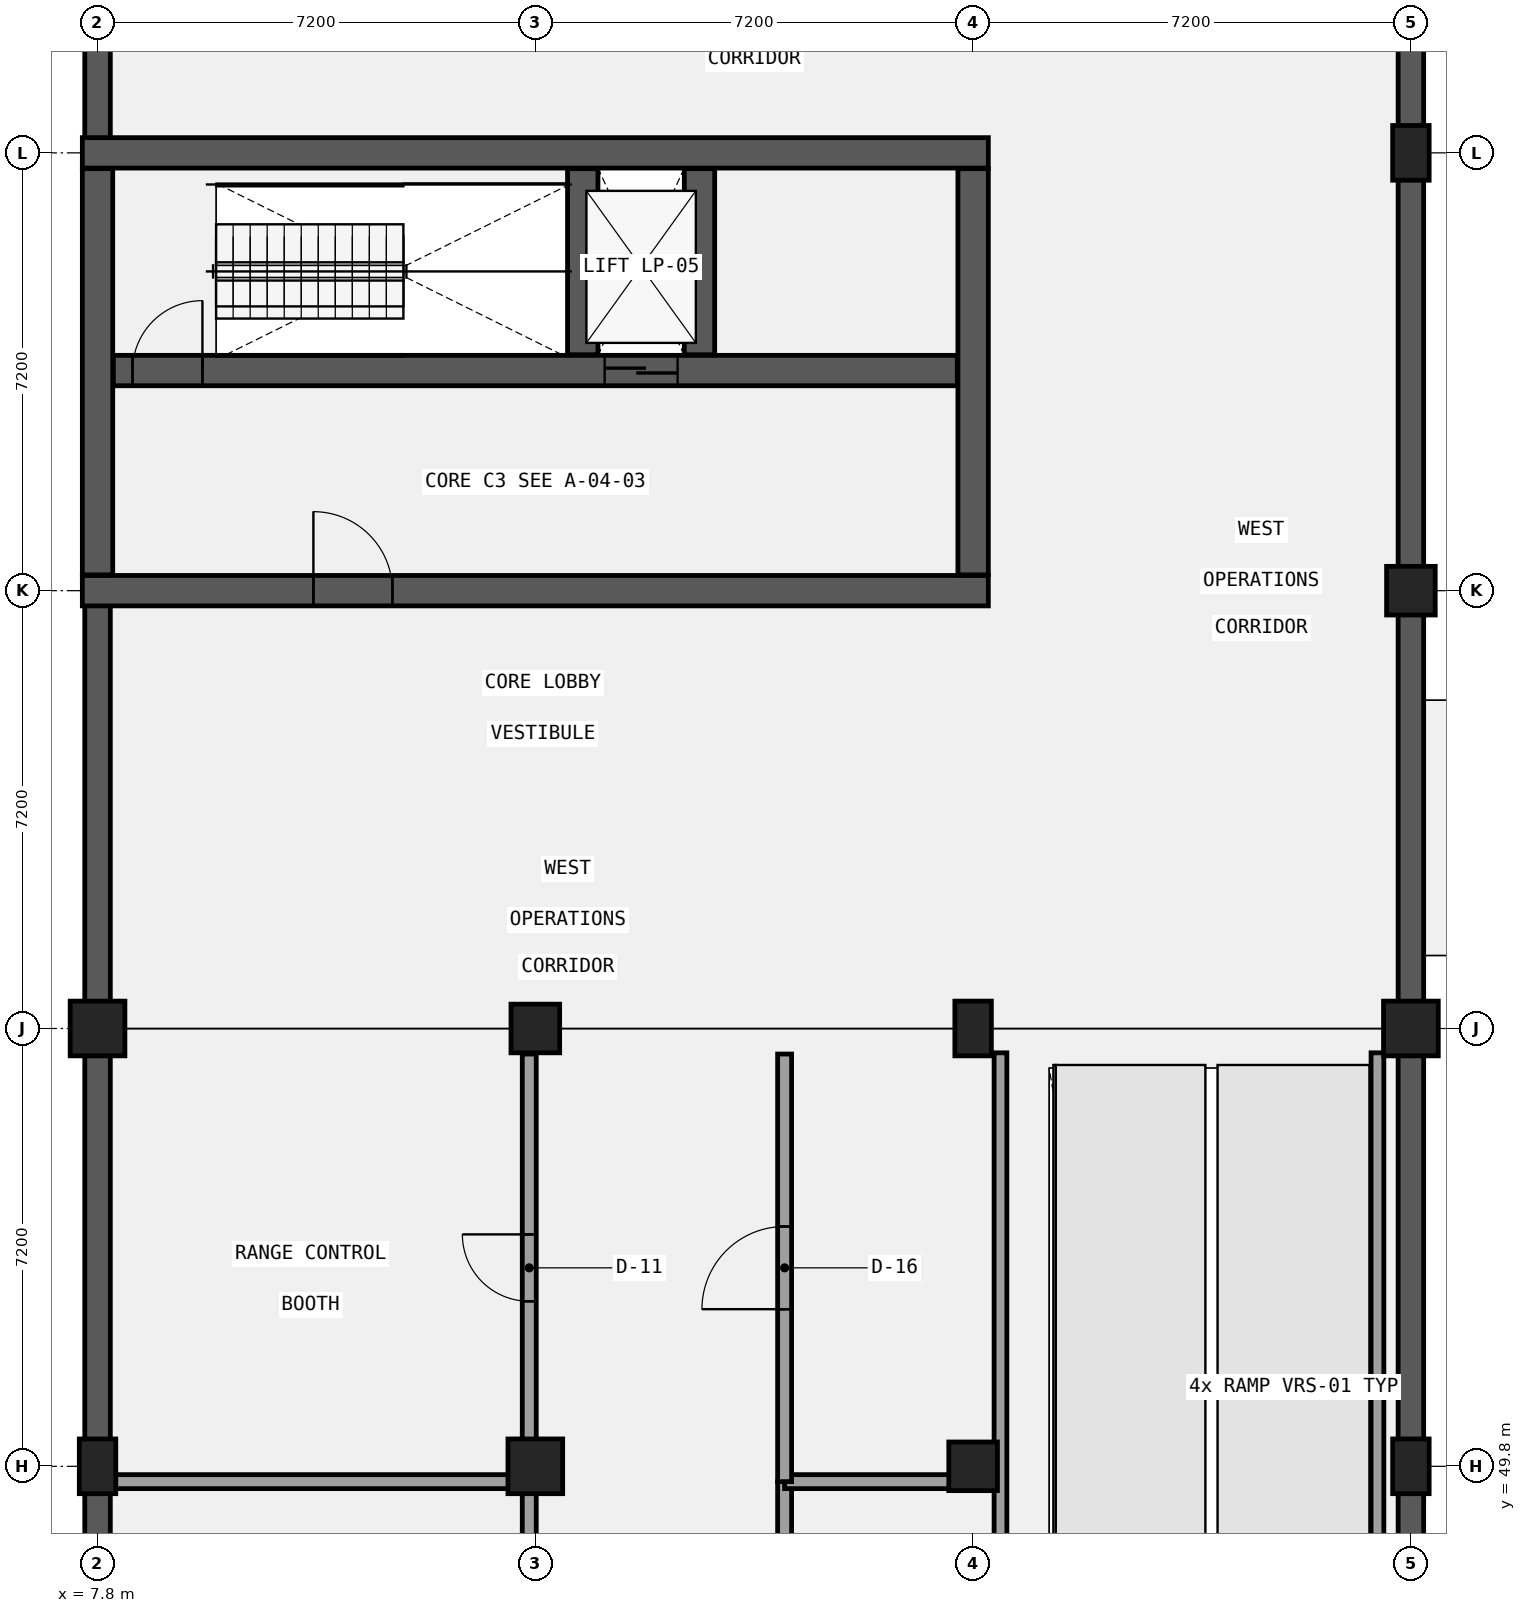
"""IFC4 building model, lengths in metres.
Left out: names, types, materials, properties, quantities, classifications, styles, units other than length and angle.
Written with IfcOpenShell. Run it as: python <this file> out.ifc"""

import sys

from ifc_helpers import new_model, si_unit, direction, frame, frame_2d, origin, origin_2d, place, context, subcontext, project, spatial, rectangle, extrude, element, fill, save


model = new_model("IFC4")
c1 = context("Model", 3, precision=1e-05, world=origin(), true_north=direction((0.0, 1.0)))
c2 = subcontext(c1, "Body", "Model", "MODEL_VIEW")
j1 = project(units=[si_unit("LENGTHUNIT", "METRE"), si_unit("PLANEANGLEUNIT", "RADIAN")], contexts=[c1])
p1 = place(None, origin())
s1 = spatial("IfcSite", under=j1, at=p1, CompositionType="ELEMENT")
p2 = place(p1, origin())
s2 = spatial("IfcBuilding", under=s1, at=p2, CompositionType="ELEMENT")
p3 = place(p2, frame((0.0, 0.0, -4.2)))
s3 = spatial("IfcBuildingStorey", under=s2, at=p3, CompositionType="ELEMENT", Elevation=-4.2)
p4 = place(p3, frame((7.8, 21.2, 0.0), z_axis=(0.0, 0.0, 1.0), x_axis=(0.0, 1.0, 0.0)))
e1 = element("IfcWall", 1, at=p4, inside=s3, PredefinedType="USERDEFINED", context=c2, shape_type="SweptSolid", body=[
    extrude(rectangle(XDim=35.6, YDim=0.42, at=frame_2d((17.8, 0.0))), origin(), (0.0, 0.0, 1.0), 2.88),
])
p5 = place(p3, frame((7.8, 57.2, 0.0), z_axis=(0.0, 0.0, 1.0), x_axis=(0.0, 1.0, 0.0)))
e2 = element("IfcWall", 2, at=p5, inside=s3, PredefinedType="USERDEFINED", context=c2, shape_type="SweptSolid", body=[
    extrude(rectangle(XDim=6.77, YDim=0.42, at=frame_2d((3.385, 0.0))), origin(), (0.0, 0.0, 1.0), 3.18),
])
p6 = place(p3, frame((7.8, 71.63, 0.0), z_axis=(0.0, 0.0, 1.0), x_axis=(0.0, 1.0, 0.0)))
e3 = element("IfcWall", 3, at=p6, inside=s3, PredefinedType="USERDEFINED", context=c2, shape_type="SweptSolid", body=[
    extrude(rectangle(XDim=6.77, YDim=0.42, at=frame_2d((3.385, 0.0))), origin(), (0.0, 0.0, 1.0), 3.03),
])
p7 = place(p3, frame((29.4, 78.4, 0.0), z_axis=(0.0, 0.0, 1.0), x_axis=(0.0, -1.0, 0.0)))
e4 = element("IfcWall", 4, at=p7, inside=s3, PredefinedType="USERDEFINED", context=c2, shape_type="SweptSolid", body=[
    extrude(rectangle(XDim=21.2, YDim=0.42, at=frame_2d((10.6, 0.0))), origin(), (0.0, 0.0, 1.0), 2.88),
])
p8 = place(p3, frame((29.4, 56.8, 0.0), z_axis=(0.0, 0.0, 1.0), x_axis=(0.0, -1.0, 0.0)))
e5 = element("IfcWall", 5, at=p8, inside=s3, PredefinedType="USERDEFINED", context=c2, shape_type="SweptSolid", body=[
    extrude(rectangle(XDim=21.2, YDim=0.42, at=frame_2d((10.6, 0.0))), origin(), (0.0, 0.0, 1.0), 3.03),
])
p9 = place(p3, frame((7.55, 71.4, 0.0), z_axis=(0.0, 0.0, 1.0), x_axis=(1.0, 0.0, 0.0)))
e6 = element("IfcWall", 6, at=p9, inside=s3, PredefinedType="SHEAR", context=c2, shape_type="SweptSolid", body=[
    extrude(rectangle(XDim=14.9, YDim=0.5, at=frame_2d((7.45, 0.0))), origin(), (0.0, 0.0, 1.0), 4.2),
])
p10 = place(p3, frame((7.55, 64.2, 0.0), z_axis=(0.0, 0.0, 1.0), x_axis=(1.0, 0.0, 0.0)))
e7 = element("IfcWall", 7, at=p10, inside=s3, PredefinedType="SHEAR", context=c2, shape_type="SweptSolid", body=[
    extrude(rectangle(XDim=14.9, YDim=0.5, at=frame_2d((7.45, 0.0))), origin(), (0.0, 0.0, 1.0), 4.2),
])
p11 = place(p10, frame((3.8, 0.0, 0.0)))
e8 = element("IfcOpeningElement", 8, at=p11, cuts=e7, PredefinedType="OPENING", context=c2, shape_type="SweptSolid", body=[
    extrude(rectangle(XDim=1.3, YDim=2.2, at=frame_2d((0.65, 1.1))), frame((0.0, 0.26, 0.0), z_axis=(0.0, -1.0, 0.0), x_axis=(1.0, 0.0, 0.0)), (0.0, 0.0, 1.0), 0.52),
])
for number, where, z_axis, x_axis in (
    (9, (7.8, 64.46, 0.0), (0.0, 0.0, 1.0), (0.0, 1.0, 0.0)),
    (10, (22.2, 64.46, 0.0), (0.0, 0.0, 1.0), (0.0, 1.0, 0.0)),
):
    element("IfcWall", number, at=place(p3, frame(where, z_axis=z_axis, x_axis=x_axis)), inside=s3, PredefinedType="SHEAR", context=c2, shape_type="SweptSolid", body=[
        extrude(rectangle(XDim=6.68, YDim=0.5, at=frame_2d((3.34, 0.0))), origin(), (0.0, 0.0, 1.0), 4.2),
    ])
p12 = place(p3, frame((8.06, 67.82, 0.0), z_axis=(0.0, 0.0, 1.0), x_axis=(1.0, 0.0, 0.0)))
e11 = element("IfcWall", 11, at=p12, inside=s3, PredefinedType="SHEAR", context=c2, shape_type="SweptSolid", body=[
    extrude(rectangle(XDim=13.88, YDim=0.5, at=frame_2d((6.94, 0.0))), origin(), (0.0, 0.0, 1.0), 4.2),
])
p13 = place(p12, frame((8.08, 0.0, 0.0)))
e12 = element("IfcOpeningElement", 12, at=p13, cuts=e11, PredefinedType="OPENING", context=c2, shape_type="SweptSolid", body=[
    extrude(rectangle(XDim=1.2, YDim=2.15, at=frame_2d((0.6, 1.075))), frame((0.0, 0.26, 0.0), z_axis=(0.0, -1.0, 0.0), x_axis=(1.0, 0.0, 0.0)), (0.0, 0.0, 1.0), 0.52),
])
p14 = place(p12, frame((0.315, 0.0, 0.0)))
e13 = element("IfcOpeningElement", 13, at=p14, cuts=e11, PredefinedType="OPENING", context=c2, shape_type="SweptSolid", body=[
    extrude(rectangle(XDim=1.15, YDim=2.15, at=frame_2d((0.575, 1.075))), frame((0.0, 0.26, 0.0), z_axis=(0.0, -1.0, 0.0), x_axis=(1.0, 0.0, 0.0)), (0.0, 0.0, 1.0), 0.52),
])
for number, where, z_axis, x_axis in (
    (14, (15.78, 68.08, 0.0), (0.0, 0.0, 1.0), (0.0, 1.0, 0.0)),
    (15, (17.7, 68.08, 0.0), (0.0, 0.0, 1.0), (0.0, 1.0, 0.0)),
):
    element("IfcWall", number, at=place(p3, frame(where, z_axis=z_axis, x_axis=x_axis)), inside=s3, PredefinedType="SHEAR", context=c2, shape_type="SweptSolid", body=[
        extrude(rectangle(XDim=3.06, YDim=0.5, at=frame_2d((1.53, 0.0))), origin(), (0.0, 0.0, 1.0), 4.2),
    ])
p15 = place(p3, frame((7.8, 49.8, 0.0), z_axis=(0.0, 0.0, 1.0), x_axis=(1.0, 0.0, 0.0)))
e16 = element("IfcColumn", 16, at=p15, inside=s3, PredefinedType="COLUMN", context=c2, shape_type="SweptSolid", body=[
    extrude(rectangle(XDim=0.6, YDim=0.9, at=origin_2d()), origin(), (0.0, 0.0, 1.0), 4.2),
])
for number, where, z_axis, x_axis in (
    (17, (7.8, 57.0, 0.0), (0.0, 0.0, 1.0), (1.0, 0.0, 0.0)),
    (18, (15.0, 49.8, 0.0), (0.0, 0.0, 1.0), (1.0, 0.0, 0.0)),
):
    element("IfcColumn", number, at=place(p3, frame(where, z_axis=z_axis, x_axis=x_axis)), inside=s3, PredefinedType="COLUMN", context=c2, shape_type="SweptSolid", body=[
        extrude(rectangle(XDim=0.9, YDim=0.9, at=origin_2d()), origin(), (0.0, 0.0, 1.0), 4.2),
    ])
for number, where, z_axis, x_axis in (
    (19, (15.0, 57.0, 0.0), (0.0, 0.0, 1.0), (1.0, 0.0, 0.0)),
    (20, (22.2, 49.8, 0.0), (0.0, 0.0, 1.0), (1.0, 0.0, 0.0)),
):
    element("IfcColumn", number, at=place(p3, frame(where, z_axis=z_axis, x_axis=x_axis)), inside=s3, PredefinedType="COLUMN", context=c2, shape_type="SweptSolid", body=[
        extrude(rectangle(XDim=0.8, YDim=0.8, at=origin_2d()), origin(), (0.0, 0.0, 1.0), 4.2),
    ])
for number, where, z_axis, x_axis in (
    (21, (22.2, 57.0, 0.0), (0.0, 0.0, 1.0), (1.0, 0.0, 0.0)),
    (22, (29.4, 49.8, 0.0), (0.0, 0.0, 1.0), (1.0, 0.0, 0.0)),
):
    element("IfcColumn", number, at=place(p3, frame(where, z_axis=z_axis, x_axis=x_axis)), inside=s3, PredefinedType="COLUMN", context=c2, shape_type="SweptSolid", body=[
        extrude(rectangle(XDim=0.6, YDim=0.9, at=origin_2d()), origin(), (0.0, 0.0, 1.0), 4.2),
    ])
p16 = place(p3, frame((29.4, 57.0, 0.0), z_axis=(0.0, 0.0, 1.0), x_axis=(1.0, 0.0, 0.0)))
e23 = element("IfcColumn", 23, at=p16, inside=s3, PredefinedType="COLUMN", context=c2, shape_type="SweptSolid", body=[
    extrude(rectangle(XDim=0.9, YDim=0.9, at=origin_2d()), origin(), (0.0, 0.0, 1.0), 4.2),
])
p17 = place(p3, frame((29.4, 64.2, 0.0), z_axis=(0.0, 0.0, 1.0), x_axis=(1.0, 0.0, 0.0)))
e24 = element("IfcColumn", 24, at=p17, inside=s3, PredefinedType="COLUMN", context=c2, shape_type="SweptSolid", body=[
    extrude(rectangle(XDim=0.8, YDim=0.8, at=origin_2d()), origin(), (0.0, 0.0, 1.0), 4.2),
])
p18 = place(p3, frame((29.4, 71.4, 0.0), z_axis=(0.0, 0.0, 1.0), x_axis=(1.0, 0.0, 0.0)))
e25 = element("IfcColumn", 25, at=p18, inside=s3, PredefinedType="COLUMN", context=c2, shape_type="SweptSolid", body=[
    extrude(rectangle(XDim=0.6, YDim=0.9, at=origin_2d()), origin(), (0.0, 0.0, 1.0), 4.2),
])
for number, where, z_axis, x_axis in (
    (26, (22.65, 24.6, 0.0), (0.0, 0.0, 1.0), (0.0, 1.0, 0.0)),
    (27, (28.85, 24.6, 0.0), (0.0, 0.0, 1.0), (0.0, 1.0, 0.0)),
):
    element("IfcWall", number, at=place(p3, frame(where, z_axis=z_axis, x_axis=x_axis)), inside=s3, PredefinedType="PARTITIONING", context=c2, shape_type="SweptSolid", body=[
        extrude(rectangle(XDim=32.0, YDim=0.21, at=frame_2d((16.0, 0.0))), origin(), (0.0, 0.0, 1.0), 3.88),
    ])
p19 = place(p3, frame((14.9, 42.516, 0.0), z_axis=(0.0, 0.0, 1.0), x_axis=(0.0, 1.0, 0.0)))
e28 = element("IfcWall", 28, at=p19, inside=s3, PredefinedType="PARTITIONING", context=c2, shape_type="SweptSolid", body=[
    extrude(rectangle(XDim=7.032, YDim=0.23, at=frame_2d((3.516, 0.0))), origin(), (0.0, 0.0, 1.0), 3.13),
])
p20 = place(p19, frame((2.966, 0.0, 0.0)))
e29 = element("IfcOpeningElement", 29, at=p20, cuts=e28, PredefinedType="OPENING", context=c2, shape_type="SweptSolid", body=[
    extrude(rectangle(XDim=1.1, YDim=2.1, at=frame_2d((0.55, 1.05))), frame((0.0, 0.125, 0.0), z_axis=(0.0, -1.0, 0.0), x_axis=(1.0, 0.0, 0.0)), (0.0, 0.0, 1.0), 0.25),
])
p21 = place(p3, frame((7.98, 49.548, 0.0), z_axis=(0.0, 0.0, 1.0), x_axis=(1.0, 0.0, 0.0)))
e30 = element("IfcWall", 30, at=p21, inside=s3, PredefinedType="PARTITIONING", context=c2, shape_type="SweptSolid", body=[
    extrude(rectangle(XDim=6.92, YDim=0.23, at=frame_2d((3.46, 0.0))), origin(), (0.0, 0.0, 1.0), 3.33),
])
p22 = place(p3, frame((14.9, 49.548, 0.0), z_axis=(0.0, 0.0, 1.0), x_axis=(0.0, 1.0, 0.0)))
e31 = element("IfcWall", 31, at=p22, inside=s3, PredefinedType="PARTITIONING", context=c2, shape_type="SweptSolid", body=[
    extrude(rectangle(XDim=7.032, YDim=0.23, at=frame_2d((3.516, 0.0))), origin(), (0.0, 0.0, 1.0), 3.13),
])
p23 = place(p22, frame((2.966, 0.0, 0.0)))
e32 = element("IfcOpeningElement", 32, at=p23, cuts=e31, PredefinedType="OPENING", context=c2, shape_type="SweptSolid", body=[
    extrude(rectangle(XDim=1.1, YDim=2.22, at=frame_2d((0.55, 1.11))), frame((0.0, 0.125, 0.0), z_axis=(0.0, -1.0, 0.0), x_axis=(1.0, 0.0, 0.0)), (0.0, 0.0, 1.0), 0.25),
])
p24 = place(p3, frame((19.1, 42.516, 0.0), z_axis=(0.0, 0.0, 1.0), x_axis=(0.0, 1.0, 0.0)))
e33 = element("IfcWall", 33, at=p24, inside=s3, PredefinedType="PARTITIONING", context=c2, shape_type="SweptSolid", body=[
    extrude(rectangle(XDim=7.032, YDim=0.23, at=frame_2d((3.516, 0.0))), origin(), (0.0, 0.0, 1.0), 3.88),
])
p25 = place(p24, frame((2.906, 0.0, 0.0)))
e34 = element("IfcOpeningElement", 34, at=p25, cuts=e33, PredefinedType="OPENING", context=c2, shape_type="SweptSolid", body=[
    extrude(rectangle(XDim=1.22, YDim=2.35, at=frame_2d((0.61, 1.175))), frame((0.0, 0.125, 0.0), z_axis=(0.0, -1.0, 0.0), x_axis=(1.0, 0.0, 0.0)), (0.0, 0.0, 1.0), 0.25),
])
p26 = place(p3, frame((19.1, 49.548, 0.0), z_axis=(0.0, 0.0, 1.0), x_axis=(1.0, 0.0, 0.0)))
e35 = element("IfcWall", 35, at=p26, inside=s3, PredefinedType="PARTITIONING", context=c2, shape_type="SweptSolid", body=[
    extrude(rectangle(XDim=3.1, YDim=0.23, at=frame_2d((1.55, 0.0))), origin(), (0.0, 0.0, 1.0), 3.28),
])
p27 = place(p3, frame((19.1, 49.548, 0.0), z_axis=(0.0, 0.0, 1.0), x_axis=(0.0, 1.0, 0.0)))
e36 = element("IfcWall", 36, at=p27, inside=s3, PredefinedType="PARTITIONING", context=c2, shape_type="SweptSolid", body=[
    extrude(rectangle(XDim=7.032, YDim=0.23, at=frame_2d((3.516, 0.0))), origin(), (0.0, 0.0, 1.0), 3.88),
])
p28 = place(p27, frame((2.836, 0.0, 0.0)))
e37 = element("IfcOpeningElement", 37, at=p28, cuts=e36, PredefinedType="OPENING", context=c2, shape_type="SweptSolid", body=[
    extrude(rectangle(XDim=1.36, YDim=2.1, at=frame_2d((0.68, 1.05))), frame((0.0, 0.125, 0.0), z_axis=(0.0, -1.0, 0.0), x_axis=(1.0, 0.0, 0.0)), (0.0, 0.0, 1.0), 0.25),
])
p29 = place(p13, frame((1.2, 0.0, 0.0), z_axis=(0.0, 0.0, 1.0), x_axis=(-1.0, 0.0, 0.0)))
e38 = element("IfcDoor", 38, at=p29, inside=s3, OperationType="DOUBLE_DOOR_SLIDING", PredefinedType="DOOR", context=c2, shape_type="SweptSolid", body=[
    extrude(rectangle(XDim=1.2, YDim=2.15, at=frame_2d((0.6, 1.075))), frame((0.0, 0.025, 0.0), z_axis=(0.0, -1.0, 0.0), x_axis=(1.0, 0.0, 0.0)), (0.0, 0.0, 1.0), 0.05),
])
fill(e12, e38)
p30 = place(p14, origin())
e39 = element("IfcDoor", 39, at=p30, inside=s3, OperationType="SINGLE_SWING_RIGHT", PredefinedType="DOOR", context=c2, shape_type="SweptSolid", body=[
    extrude(rectangle(XDim=1.15, YDim=2.15, at=frame_2d((0.575, 1.075))), frame((0.0, 0.025, 0.0), z_axis=(0.0, -1.0, 0.0), x_axis=(1.0, 0.0, 0.0)), (0.0, 0.0, 1.0), 0.05),
])
fill(e13, e39)
p31 = place(p11, frame((1.3, 0.0, 0.0), z_axis=(0.0, 0.0, 1.0), x_axis=(-1.0, 0.0, 0.0)))
e40 = element("IfcDoor", 40, at=p31, inside=s3, OperationType="SINGLE_SWING_LEFT", PredefinedType="DOOR", context=c2, shape_type="SweptSolid", body=[
    extrude(rectangle(XDim=1.3, YDim=2.2, at=frame_2d((0.65, 1.1))), frame((0.0, 0.025, 0.0), z_axis=(0.0, -1.0, 0.0), x_axis=(1.0, 0.0, 0.0)), (0.0, 0.0, 1.0), 0.05),
])
fill(e8, e40)
p32 = place(p23, frame((1.1, 0.0, 0.0), z_axis=(0.0, 0.0, 1.0), x_axis=(-1.0, 0.0, 0.0)))
e41 = element("IfcDoor", 41, at=p32, inside=s3, OperationType="SINGLE_SWING_RIGHT", PredefinedType="DOOR", context=c2, shape_type="SweptSolid", body=[
    extrude(rectangle(XDim=1.1, YDim=2.22, at=frame_2d((0.55, 1.11))), frame((0.0, 0.025, 0.0), z_axis=(0.0, -1.0, 0.0), x_axis=(1.0, 0.0, 0.0)), (0.0, 0.0, 1.0), 0.05),
])
fill(e32, e41)
p33 = place(p28, origin())
e42 = element("IfcDoor", 42, at=p33, inside=s3, OperationType="SINGLE_SWING_LEFT", PredefinedType="DOOR", context=c2, shape_type="SweptSolid", body=[
    extrude(rectangle(XDim=1.36, YDim=2.1, at=frame_2d((0.68, 1.05))), frame((0.0, 0.025, 0.0), z_axis=(0.0, -1.0, 0.0), x_axis=(1.0, 0.0, 0.0)), (0.0, 0.0, 1.0), 0.05),
])
fill(e37, e42)
save(model, sys.argv[1])
